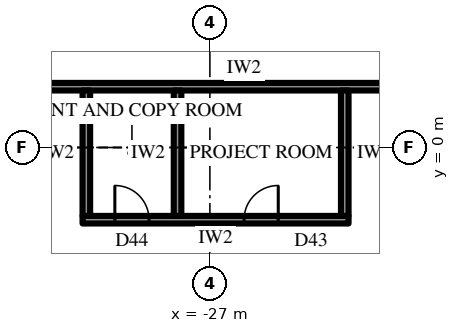
"""IFC4 building model, lengths in metres.
Left out: names, types, materials, properties, quantities, classifications, styles, units other than length and angle.
Written with IfcOpenShell. Run it as: python <this file> out.ifc"""

import sys

from ifc_helpers import new_model, si_unit, direction, frame, frame_2d, origin, place, context, subcontext, project, spatial, rectangle, extrude, element, fill, save


model = new_model("IFC4")
c1 = context("Model", 3, precision=1e-05, world=origin(), true_north=direction((0.0, 1.0)))
c2 = subcontext(c1, "Body", "Model", "MODEL_VIEW")
j1 = project(units=[si_unit("LENGTHUNIT", "METRE"), si_unit("PLANEANGLEUNIT", "RADIAN")], contexts=[c1])
p1 = place(None, origin())
s1 = spatial("IfcSite", under=j1, at=p1, CompositionType="ELEMENT")
p2 = place(p1, origin())
s2 = spatial("IfcBuilding", under=s1, at=p2, CompositionType="ELEMENT")
p3 = place(p2, frame((0.0, 0.0, 157.3)))
s3 = spatial("IfcBuildingStorey", under=s2, at=p3, CompositionType="ELEMENT", Elevation=157.3)
p4 = place(p3, frame((-34.656, -2.675, 0.0), z_axis=(0.0, 0.0, 1.0), x_axis=(0.500003084452, -0.866023622968, 0.0)))
e1 = element("IfcWall", 1, at=p4, inside=s3, PredefinedType="SOLIDWALL", context=c2, shape_type="SweptSolid", body=[
    extrude(rectangle(XDim=30.022, YDim=0.3, at=frame_2d((15.011, 0.0))), origin(), (0.0, 0.0, 1.0), 2.75),
])
p5 = place(p4, frame((1.052, 0.0, 0.6)))
e2 = element("IfcOpeningElement", 2, at=p5, cuts=e1, PredefinedType="OPENING", context=c2, shape_type="SweptSolid", body=[
    extrude(rectangle(XDim=2.9, YDim=1.9, at=frame_2d((1.45, 0.95))), frame((0.0, 0.16, 0.0), z_axis=(0.0, -1.0, 0.0), x_axis=(1.0, 0.0, 0.0)), (0.0, 0.0, 1.0), 0.32),
])
p6 = place(p4, frame((6.056, 0.0, 0.6)))
e3 = element("IfcOpeningElement", 3, at=p6, cuts=e1, PredefinedType="OPENING", context=c2, shape_type="SweptSolid", body=[
    extrude(rectangle(XDim=2.9, YDim=1.9, at=frame_2d((1.45, 0.95))), frame((0.0, 0.16, 0.0), z_axis=(0.0, -1.0, 0.0), x_axis=(1.0, 0.0, 0.0)), (0.0, 0.0, 1.0), 0.32),
])
p7 = place(p4, frame((11.909, 0.0, 0.0)))
e4 = element("IfcOpeningElement", 4, at=p7, cuts=e1, PredefinedType="OPENING", context=c2, shape_type="SweptSolid", body=[
    extrude(rectangle(XDim=1.2, YDim=2.4, at=frame_2d((0.6, 1.2))), frame((0.0, 0.16, 0.0), z_axis=(0.0, -1.0, 0.0), x_axis=(1.0, 0.0, 0.0)), (0.0, 0.0, 1.0), 0.32),
])
p8 = place(p4, frame((16.063, 0.0, 0.6)))
e5 = element("IfcOpeningElement", 5, at=p8, cuts=e1, PredefinedType="OPENING", context=c2, shape_type="SweptSolid", body=[
    extrude(rectangle(XDim=2.9, YDim=1.9, at=frame_2d((1.45, 0.95))), frame((0.0, 0.16, 0.0), z_axis=(0.0, -1.0, 0.0), x_axis=(1.0, 0.0, 0.0)), (0.0, 0.0, 1.0), 0.32),
])
p9 = place(p4, frame((21.067, 0.0, 0.6)))
e6 = element("IfcOpeningElement", 6, at=p9, cuts=e1, PredefinedType="OPENING", context=c2, shape_type="SweptSolid", body=[
    extrude(rectangle(XDim=2.9, YDim=1.9, at=frame_2d((1.45, 0.95))), frame((0.0, 0.16, 0.0), z_axis=(0.0, -1.0, 0.0), x_axis=(1.0, 0.0, 0.0)), (0.0, 0.0, 1.0), 0.32),
])
p10 = place(p4, frame((26.07, 0.0, 0.6)))
e7 = element("IfcOpeningElement", 7, at=p10, cuts=e1, PredefinedType="OPENING", context=c2, shape_type="SweptSolid", body=[
    extrude(rectangle(XDim=2.9, YDim=1.9, at=frame_2d((1.45, 0.95))), frame((0.0, 0.16, 0.0), z_axis=(0.0, -1.0, 0.0), x_axis=(1.0, 0.0, 0.0)), (0.0, 0.0, 1.0), 0.32),
])
p11 = place(p3, frame((-18.6, 1.6, 0.0), z_axis=(0.0, 0.0, 1.0), x_axis=(-1.0, 0.0, 0.0)))
e8 = element("IfcWall", 8, at=p11, inside=s3, PredefinedType="PARTITIONING", context=c2, shape_type="SweptSolid", body=[
    extrude(rectangle(XDim=15.002, YDim=0.2, at=frame_2d((7.501, 0.0))), origin(), (0.0, 0.0, 1.0), 4.0),
])
p12 = place(p11, frame((1.0, 0.0, 0.0)))
e9 = element("IfcOpeningElement", 9, at=p12, cuts=e8, PredefinedType="OPENING", context=c2, shape_type="SweptSolid", body=[
    extrude(rectangle(XDim=1.0, YDim=2.2, at=frame_2d((0.5, 1.1))), frame((0.0, 0.11, 0.0), z_axis=(0.0, -1.0, 0.0), x_axis=(1.0, 0.0, 0.0)), (0.0, 0.0, 1.0), 0.22),
])
p13 = place(p3, frame((-23.351, -1.9, 0.0), z_axis=(0.0, 0.0, 1.0), x_axis=(-1.0, 0.0, 0.0)))
e10 = element("IfcWall", 10, at=p13, inside=s3, PredefinedType="PARTITIONING", context=c2, shape_type="SweptSolid", body=[
    extrude(rectangle(XDim=7.0, YDim=0.2, at=frame_2d((3.5, 0.0))), origin(), (0.0, 0.0, 1.0), 4.0),
])
p14 = place(p13, frame((1.85, 0.0, 0.0)))
e11 = element("IfcOpeningElement", 11, at=p14, cuts=e10, PredefinedType="OPENING", context=c2, shape_type="SweptSolid", body=[
    extrude(rectangle(XDim=0.9, YDim=2.2, at=frame_2d((0.45, 1.1))), frame((0.0, 0.11, 0.0), z_axis=(0.0, -1.0, 0.0), x_axis=(1.0, 0.0, 0.0)), (0.0, 0.0, 1.0), 0.22),
])
p15 = place(p13, frame((5.25, 0.0, 0.0)))
e12 = element("IfcOpeningElement", 12, at=p15, cuts=e10, PredefinedType="OPENING", context=c2, shape_type="SweptSolid", body=[
    extrude(rectangle(XDim=0.9, YDim=2.2, at=frame_2d((0.45, 1.1))), frame((0.0, 0.11, 0.0), z_axis=(0.0, -1.0, 0.0), x_axis=(1.0, 0.0, 0.0)), (0.0, 0.0, 1.0), 0.22),
])
for number, where, z_axis, x_axis in (
    (13, (-23.451, 1.5, 0.0), (0.0, 0.0, 1.0), (0.0, -1.0, 0.0)),
    (14, (-27.851, 1.5, 0.0), (0.0, 0.0, 1.0), (0.0, -1.0, 0.0)),
    (15, (-30.251, 1.5, 0.0), (0.0, 0.0, 1.0), (0.0, -1.0, 0.0)),
):
    element("IfcWall", number, at=place(p3, frame(where, z_axis=z_axis, x_axis=x_axis)), inside=s3, PredefinedType="PARTITIONING", context=c2, shape_type="SweptSolid", body=[
        extrude(rectangle(XDim=3.3, YDim=0.2, at=frame_2d((1.65, 0.0))), origin(), (0.0, 0.0, 1.0), 4.0),
    ])
p16 = place(p14, frame((0.9, 0.0, 0.0), z_axis=(0.0, 0.0, 1.0), x_axis=(-1.0, 0.0, 0.0)))
e16 = element("IfcDoor", 16, at=p16, inside=s3, OperationType="SINGLE_SWING_LEFT", PredefinedType="DOOR", context=c2, shape_type="SweptSolid", body=[
    extrude(rectangle(XDim=0.9, YDim=2.2, at=frame_2d((0.45, 1.1))), frame((0.0, 0.025, 0.0), z_axis=(0.0, -1.0, 0.0), x_axis=(1.0, 0.0, 0.0)), (0.0, 0.0, 1.0), 0.05),
])
fill(e11, e16)
p17 = place(p15, frame((0.9, 0.0, 0.0), z_axis=(0.0, 0.0, 1.0), x_axis=(-1.0, 0.0, 0.0)))
e17 = element("IfcDoor", 17, at=p17, inside=s3, OperationType="SINGLE_SWING_RIGHT", PredefinedType="DOOR", context=c2, shape_type="SweptSolid", body=[
    extrude(rectangle(XDim=0.9, YDim=2.2, at=frame_2d((0.45, 1.1))), frame((0.0, 0.025, 0.0), z_axis=(0.0, -1.0, 0.0), x_axis=(1.0, 0.0, 0.0)), (0.0, 0.0, 1.0), 0.05),
])
fill(e12, e17)
save(model, sys.argv[1])
